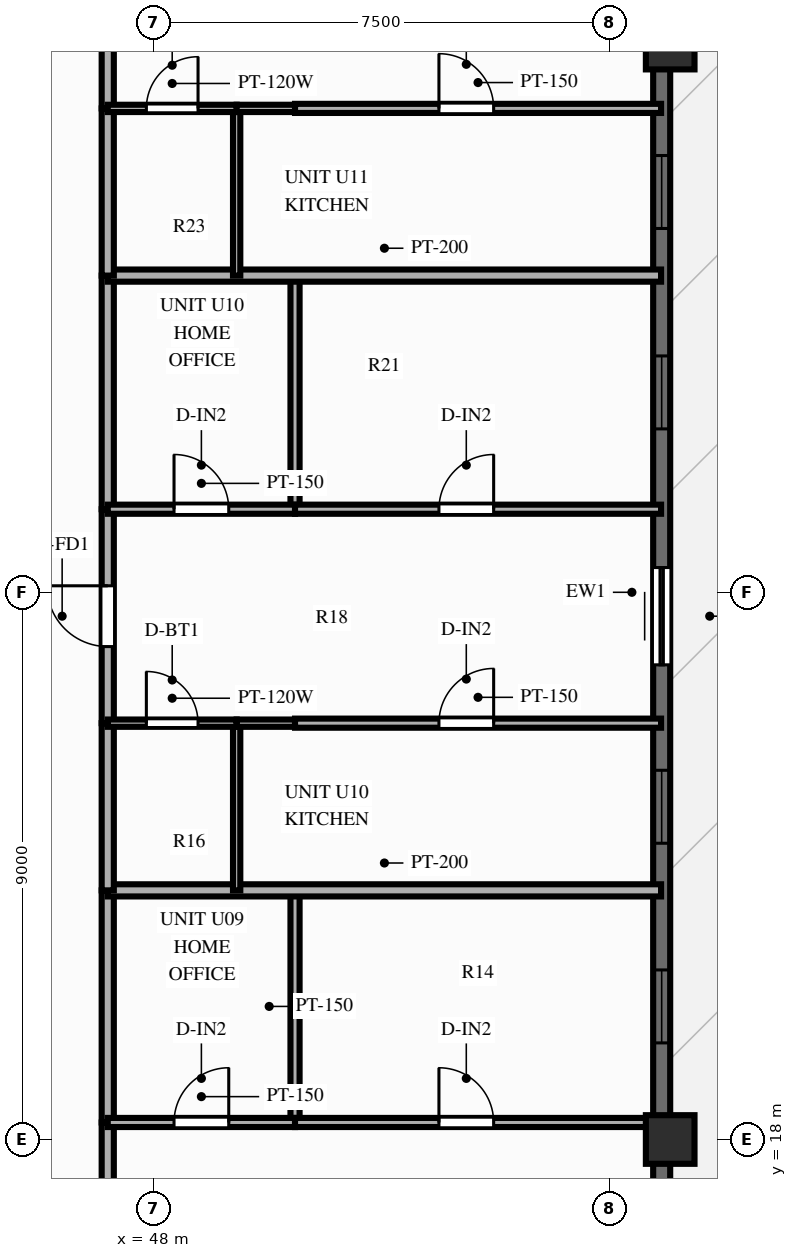
"""IFC4 building model, lengths in metres.
Left out: names, types, materials, properties, quantities, classifications, styles, units other than length and angle.
Written with IfcOpenShell. Run it as: python <this file> out.ifc"""

import sys

from ifc_helpers import new_model, si_unit, direction, frame, frame_2d, origin, origin_2d, place, context, subcontext, project, spatial, rectangle, extrude, source, transform, mapped, element, fill, save


model = new_model("IFC4")
c1 = context("Model", 3, precision=1e-05, world=origin(), true_north=direction((0.0, 1.0)))
c2 = subcontext(c1, "Body", "Model", "MODEL_VIEW")
j1 = project(units=[si_unit("LENGTHUNIT", "METRE"), si_unit("PLANEANGLEUNIT", "RADIAN")], contexts=[c1])
p1 = place(None, origin())
s1 = spatial("IfcSite", under=j1, at=p1, CompositionType="ELEMENT")
p2 = place(p1, origin())
s2 = spatial("IfcBuilding", under=s1, at=p2, CompositionType="ELEMENT")
p3 = place(p2, frame((0.0, 0.0, 199.6)))
s3 = spatial("IfcBuildingStorey", under=s2, at=p3, CompositionType="ELEMENT", Elevation=199.6)
m1 = source(origin(), c2, "Body", "SweptSolid", [
    extrude(rectangle(XDim=0.8, YDim=0.8, at=origin_2d()), origin(), (0.0, 0.0, 1.0), 3.0),
])
for number, where, z_axis, x_axis in (
    (1, (56.5, 18.0, 0.0), (0.0, 0.0, 1.0), (1.0, 0.0, 0.0)),
    (2, (56.5, 36.0, 0.0), (0.0, 0.0, 1.0), (1.0, 0.0, 0.0)),
):
    element("IfcColumn", number, at=place(p3, frame(where, z_axis=z_axis, x_axis=x_axis)), inside=s3, PredefinedType="COLUMN", context=c2, shape_type="MappedRepresentation", body=[
        mapped(m1, transform((0.0, 0.0, 0.0), scale=1.0)),
    ])
p4 = place(p3, frame((56.36, 11.5, 0.0), z_axis=(0.0, 0.0, 1.0), x_axis=(0.0, 1.0, 0.0)))
e3 = element("IfcWall", 3, at=p4, inside=s3, PredefinedType="SOLIDWALL", context=c2, shape_type="SweptSolid", body=[
    extrude(rectangle(XDim=31.0, YDim=0.28, at=frame_2d((15.5, 0.0))), origin(), (0.0, 0.0, 1.0), 2.28),
])
p5 = place(p4, frame((0.985, 0.0, 0.25)))
e4 = element("IfcOpeningElement", 4, at=p5, cuts=e3, PredefinedType="OPENING", context=c2, shape_type="SweptSolid", body=[
    extrude(rectangle(XDim=1.2, YDim=1.5, at=frame_2d((0.6, 0.75))), frame((0.0, 0.152, 0.0), z_axis=(0.0, -1.0, 0.0), x_axis=(1.0, 0.0, 0.0)), (0.0, 0.0, 1.0), 0.304),
])
p6 = place(p4, frame((3.995, 0.0, 0.25)))
e5 = element("IfcOpeningElement", 5, at=p6, cuts=e3, PredefinedType="OPENING", context=c2, shape_type="SweptSolid", body=[
    extrude(rectangle(XDim=1.2, YDim=1.5, at=frame_2d((0.6, 0.75))), frame((0.0, 0.152, 0.0), z_axis=(0.0, -1.0, 0.0), x_axis=(1.0, 0.0, 0.0)), (0.0, 0.0, 1.0), 0.304),
])
p7 = place(p4, frame((8.089, 0.0, 0.25)))
e6 = element("IfcOpeningElement", 6, at=p7, cuts=e3, PredefinedType="OPENING", context=c2, shape_type="SweptSolid", body=[
    extrude(rectangle(XDim=1.2, YDim=1.5, at=frame_2d((0.6, 0.75))), frame((0.0, 0.152, 0.0), z_axis=(0.0, -1.0, 0.0), x_axis=(1.0, 0.0, 0.0)), (0.0, 0.0, 1.0), 0.304),
])
p8 = place(p4, frame((11.373, 0.0, 0.25)))
e7 = element("IfcOpeningElement", 7, at=p8, cuts=e3, PredefinedType="OPENING", context=c2, shape_type="SweptSolid", body=[
    extrude(rectangle(XDim=1.2, YDim=1.5, at=frame_2d((0.6, 0.75))), frame((0.0, 0.152, 0.0), z_axis=(0.0, -1.0, 0.0), x_axis=(1.0, 0.0, 0.0)), (0.0, 0.0, 1.0), 0.304),
])
p9 = place(p4, frame((15.907, 0.0, 0.0), z_axis=(0.0, 0.0, 1.0), x_axis=(-1.0, 0.0, 0.0)))
e8 = element("IfcOpeningElement", 8, at=p9, cuts=e3, PredefinedType="OPENING", context=c2, shape_type="SweptSolid", body=[
    extrude(rectangle(XDim=1.6, YDim=2.15, at=frame_2d((0.8, 1.075))), frame((0.0, 0.152, 0.0), z_axis=(0.0, -1.0, 0.0), x_axis=(1.0, 0.0, 0.0)), (0.0, 0.0, 1.0), 0.304),
])
p10 = place(p4, frame((18.188, 0.0, 0.25)))
e9 = element("IfcOpeningElement", 9, at=p10, cuts=e3, PredefinedType="OPENING", context=c2, shape_type="SweptSolid", body=[
    extrude(rectangle(XDim=1.2, YDim=1.5, at=frame_2d((0.6, 0.75))), frame((0.0, 0.152, 0.0), z_axis=(0.0, -1.0, 0.0), x_axis=(1.0, 0.0, 0.0)), (0.0, 0.0, 1.0), 0.304),
])
p11 = place(p4, frame((21.484, 0.0, 0.25)))
e10 = element("IfcOpeningElement", 10, at=p11, cuts=e3, PredefinedType="OPENING", context=c2, shape_type="SweptSolid", body=[
    extrude(rectangle(XDim=1.2, YDim=1.5, at=frame_2d((0.6, 0.75))), frame((0.0, 0.152, 0.0), z_axis=(0.0, -1.0, 0.0), x_axis=(1.0, 0.0, 0.0)), (0.0, 0.0, 1.0), 0.304),
])
p12 = place(p4, frame((25.259, 0.0, 0.25)))
e11 = element("IfcOpeningElement", 11, at=p12, cuts=e3, PredefinedType="OPENING", context=c2, shape_type="SweptSolid", body=[
    extrude(rectangle(XDim=1.2, YDim=1.5, at=frame_2d((0.6, 0.75))), frame((0.0, 0.152, 0.0), z_axis=(0.0, -1.0, 0.0), x_axis=(1.0, 0.0, 0.0)), (0.0, 0.0, 1.0), 0.304),
])
p13 = place(p4, frame((28.269, 0.0, 0.25)))
e12 = element("IfcOpeningElement", 12, at=p13, cuts=e3, PredefinedType="OPENING", context=c2, shape_type="SweptSolid", body=[
    extrude(rectangle(XDim=1.2, YDim=1.5, at=frame_2d((0.6, 0.75))), frame((0.0, 0.152, 0.0), z_axis=(0.0, -1.0, 0.0), x_axis=(1.0, 0.0, 0.0)), (0.0, 0.0, 1.0), 0.304),
])
p14 = place(p3, frame((47.25, 14.43, 0.0), z_axis=(0.0, 0.0, 1.0), x_axis=(0.0, 1.0, 0.0)))
e13 = element("IfcWall", 13, at=p14, inside=s3, PredefinedType="PARTITIONING", context=c2, shape_type="SweptSolid", body=[
    extrude(rectangle(XDim=3.85, YDim=0.2, at=frame_2d((1.925, 0.0))), origin(), (0.0, 0.0, 1.0), 2.79),
])
p15 = place(p14, frame((1.425, 0.0, 0.0)))
e14 = element("IfcOpeningElement", 14, at=p15, cuts=e13, PredefinedType="OPENING", context=c2, shape_type="SweptSolid", body=[
    extrude(rectangle(XDim=1.0, YDim=2.15, at=frame_2d((0.5, 1.075))), frame((0.0, 0.112, 0.0), z_axis=(0.0, -1.0, 0.0), x_axis=(1.0, 0.0, 0.0)), (0.0, 0.0, 1.0), 0.224),
])
p16 = place(p3, frame((47.25, 18.28, 0.0), z_axis=(0.0, 0.0, 1.0), x_axis=(0.0, 1.0, 0.0)))
e15 = element("IfcWall", 15, at=p16, inside=s3, PredefinedType="PARTITIONING", context=c2, shape_type="SweptSolid", body=[
    extrude(rectangle(XDim=3.818, YDim=0.2, at=frame_2d((1.909, 0.0))), origin(), (0.0, 0.0, 1.0), 2.79),
])
p17 = place(p3, frame((50.33, 18.28, 0.0), z_axis=(0.0, 0.0, 1.0), x_axis=(0.0, 1.0, 0.0)))
e16 = element("IfcWall", 16, at=p17, inside=s3, PredefinedType="PARTITIONING", context=c2, shape_type="SweptSolid", body=[
    extrude(rectangle(XDim=3.818, YDim=0.15, at=frame_2d((1.909, 0.0))), origin(), (0.0, 0.0, 1.0), 2.49),
])
p18 = place(p3, frame((47.25, 18.28, 0.0), z_axis=(0.0, 0.0, 1.0), x_axis=(1.0, 0.0, 0.0)))
e17 = element("IfcWall", 17, at=p18, inside=s3, PredefinedType="PARTITIONING", context=c2, shape_type="SweptSolid", body=[
    extrude(rectangle(XDim=3.08, YDim=0.15, at=frame_2d((1.54, 0.0))), origin(), (0.0, 0.0, 1.0), 2.79),
])
p19 = place(p18, frame((1.09, 0.0, 0.0)))
e18 = element("IfcOpeningElement", 18, at=p19, cuts=e17, PredefinedType="OPENING", context=c2, shape_type="SweptSolid", body=[
    extrude(rectangle(XDim=0.9, YDim=2.1, at=frame_2d((0.45, 1.05))), frame((0.0, 0.087, 0.0), z_axis=(0.0, -1.0, 0.0), x_axis=(1.0, 0.0, 0.0)), (0.0, 0.0, 1.0), 0.174),
])
p20 = place(p3, frame((50.33, 18.28, 0.0), z_axis=(0.0, 0.0, 1.0), x_axis=(1.0, 0.0, 0.0)))
e19 = element("IfcWall", 19, at=p20, inside=s3, PredefinedType="PARTITIONING", context=c2, shape_type="SweptSolid", body=[
    extrude(rectangle(XDim=6.02, YDim=0.15, at=frame_2d((3.01, 0.0))), origin(), (0.0, 0.0, 1.0), 2.79),
])
p21 = place(p20, frame((2.367, 0.0, 0.0)))
e20 = element("IfcOpeningElement", 20, at=p21, cuts=e19, PredefinedType="OPENING", context=c2, shape_type="SweptSolid", body=[
    extrude(rectangle(XDim=0.9, YDim=2.1, at=frame_2d((0.45, 1.05))), frame((0.0, 0.087, 0.0), z_axis=(0.0, -1.0, 0.0), x_axis=(1.0, 0.0, 0.0)), (0.0, 0.0, 1.0), 0.174),
])
p22 = place(p3, frame((47.25, 22.098, 0.0), z_axis=(0.0, 0.0, 1.0), x_axis=(1.0, 0.0, 0.0)))
e21 = element("IfcWall", 21, at=p22, inside=s3, PredefinedType="PARTITIONING", context=c2, shape_type="SweptSolid", body=[
    extrude(rectangle(XDim=9.1, YDim=0.2, at=frame_2d((4.55, 0.0))), origin(), (0.0, 0.0, 1.0), 2.39),
])
p23 = place(p3, frame((47.25, 22.098, 0.0), z_axis=(0.0, 0.0, 1.0), x_axis=(0.0, 1.0, 0.0)))
e22 = element("IfcWall", 22, at=p23, inside=s3, PredefinedType="PARTITIONING", context=c2, shape_type="SweptSolid", body=[
    extrude(rectangle(XDim=2.75, YDim=0.2, at=frame_2d((1.375, 0.0))), origin(), (0.0, 0.0, 1.0), 2.79),
])
p24 = place(p3, frame((47.25, 24.848, 0.0), z_axis=(0.0, 0.0, 1.0), x_axis=(0.0, 1.0, 0.0)))
e23 = element("IfcWall", 23, at=p24, inside=s3, PredefinedType="PARTITIONING", context=c2, shape_type="SweptSolid", body=[
    extrude(rectangle(XDim=3.519, YDim=0.2, at=frame_2d((1.759, 0.0))), origin(), (0.0, 0.0, 1.0), 2.79),
])
p25 = place(p24, frame((1.26, 0.0, 0.0)))
e24 = element("IfcOpeningElement", 24, at=p25, cuts=e23, PredefinedType="OPENING", context=c2, shape_type="SweptSolid", body=[
    extrude(rectangle(XDim=1.0, YDim=2.15, at=frame_2d((0.5, 1.075))), frame((0.0, 0.112, 0.0), z_axis=(0.0, -1.0, 0.0), x_axis=(1.0, 0.0, 0.0)), (0.0, 0.0, 1.0), 0.224),
])
p26 = place(p3, frame((47.25, 28.366, 0.0), z_axis=(0.0, 0.0, 1.0), x_axis=(0.0, 1.0, 0.0)))
e25 = element("IfcWall", 25, at=p26, inside=s3, PredefinedType="PARTITIONING", context=c2, shape_type="SweptSolid", body=[
    extrude(rectangle(XDim=3.842, YDim=0.2, at=frame_2d((1.921, 0.0))), origin(), (0.0, 0.0, 1.0), 2.79),
])
p27 = place(p3, frame((49.37, 22.098, 0.0), z_axis=(0.0, 0.0, 1.0), x_axis=(0.0, 1.0, 0.0)))
e26 = element("IfcWall", 26, at=p27, inside=s3, PredefinedType="PARTITIONING", context=c2, shape_type="SweptSolid", body=[
    extrude(rectangle(XDim=2.75, YDim=0.12, at=frame_2d((1.375, 0.0))), origin(), (0.0, 0.0, 1.0), 2.79),
])
p28 = place(p3, frame((50.33, 28.366, 0.0), z_axis=(0.0, 0.0, 1.0), x_axis=(0.0, 1.0, 0.0)))
e27 = element("IfcWall", 27, at=p28, inside=s3, PredefinedType="PARTITIONING", context=c2, shape_type="SweptSolid", body=[
    extrude(rectangle(XDim=3.842, YDim=0.15, at=frame_2d((1.921, 0.0))), origin(), (0.0, 0.0, 1.0), 2.49),
])
p29 = place(p3, frame((47.25, 24.848, 0.0), z_axis=(0.0, 0.0, 1.0), x_axis=(1.0, 0.0, 0.0)))
e28 = element("IfcWall", 28, at=p29, inside=s3, PredefinedType="PARTITIONING", context=c2, shape_type="SweptSolid", body=[
    extrude(rectangle(XDim=2.12, YDim=0.12, at=frame_2d((1.06, 0.0))), origin(), (0.0, 0.0, 1.0), 2.79),
])
p30 = place(p29, frame((0.635, 0.0, 0.0)))
e29 = element("IfcOpeningElement", 29, at=p30, cuts=e28, PredefinedType="OPENING", context=c2, shape_type="SweptSolid", body=[
    extrude(rectangle(XDim=0.85, YDim=2.05, at=frame_2d((0.425, 1.025))), frame((0.0, 0.072, 0.0), z_axis=(0.0, -1.0, 0.0), x_axis=(1.0, 0.0, 0.0)), (0.0, 0.0, 1.0), 0.144),
])
p31 = place(p3, frame((49.37, 24.848, 0.0), z_axis=(0.0, 0.0, 1.0), x_axis=(1.0, 0.0, 0.0)))
e30 = element("IfcWall", 30, at=p31, inside=s3, PredefinedType="PARTITIONING", context=c2, shape_type="SweptSolid", body=[
    extrude(rectangle(XDim=0.96, YDim=0.12, at=frame_2d((0.48, 0.0))), origin(), (0.0, 0.0, 1.0), 2.79),
])
p32 = place(p3, frame((50.33, 24.848, 0.0), z_axis=(0.0, 0.0, 1.0), x_axis=(1.0, 0.0, 0.0)))
e31 = element("IfcWall", 31, at=p32, inside=s3, PredefinedType="PARTITIONING", context=c2, shape_type="SweptSolid", body=[
    extrude(rectangle(XDim=6.02, YDim=0.15, at=frame_2d((3.01, 0.0))), origin(), (0.0, 0.0, 1.0), 2.79),
])
p33 = place(p32, frame((2.367, 0.0, 0.0)))
e32 = element("IfcOpeningElement", 32, at=p33, cuts=e31, PredefinedType="OPENING", context=c2, shape_type="SweptSolid", body=[
    extrude(rectangle(XDim=0.9, YDim=2.1, at=frame_2d((0.45, 1.05))), frame((0.0, 0.087, 0.0), z_axis=(0.0, -1.0, 0.0), x_axis=(1.0, 0.0, 0.0)), (0.0, 0.0, 1.0), 0.174),
])
p34 = place(p3, frame((47.25, 28.366, 0.0), z_axis=(0.0, 0.0, 1.0), x_axis=(1.0, 0.0, 0.0)))
e33 = element("IfcWall", 33, at=p34, inside=s3, PredefinedType="PARTITIONING", context=c2, shape_type="SweptSolid", body=[
    extrude(rectangle(XDim=3.08, YDim=0.15, at=frame_2d((1.54, 0.0))), origin(), (0.0, 0.0, 1.0), 2.79),
])
p35 = place(p34, frame((1.09, 0.0, 0.0)))
e34 = element("IfcOpeningElement", 34, at=p35, cuts=e33, PredefinedType="OPENING", context=c2, shape_type="SweptSolid", body=[
    extrude(rectangle(XDim=0.9, YDim=2.1, at=frame_2d((0.45, 1.05))), frame((0.0, 0.087, 0.0), z_axis=(0.0, -1.0, 0.0), x_axis=(1.0, 0.0, 0.0)), (0.0, 0.0, 1.0), 0.174),
])
p36 = place(p3, frame((50.33, 28.366, 0.0), z_axis=(0.0, 0.0, 1.0), x_axis=(1.0, 0.0, 0.0)))
e35 = element("IfcWall", 35, at=p36, inside=s3, PredefinedType="PARTITIONING", context=c2, shape_type="SweptSolid", body=[
    extrude(rectangle(XDim=6.02, YDim=0.15, at=frame_2d((3.01, 0.0))), origin(), (0.0, 0.0, 1.0), 2.79),
])
p37 = place(p36, frame((2.367, 0.0, 0.0)))
e36 = element("IfcOpeningElement", 36, at=p37, cuts=e35, PredefinedType="OPENING", context=c2, shape_type="SweptSolid", body=[
    extrude(rectangle(XDim=0.9, YDim=2.1, at=frame_2d((0.45, 1.05))), frame((0.0, 0.087, 0.0), z_axis=(0.0, -1.0, 0.0), x_axis=(1.0, 0.0, 0.0)), (0.0, 0.0, 1.0), 0.174),
])
p38 = place(p3, frame((47.25, 32.209, 0.0), z_axis=(0.0, 0.0, 1.0), x_axis=(1.0, 0.0, 0.0)))
e37 = element("IfcWall", 37, at=p38, inside=s3, PredefinedType="PARTITIONING", context=c2, shape_type="SweptSolid", body=[
    extrude(rectangle(XDim=9.1, YDim=0.2, at=frame_2d((4.55, 0.0))), origin(), (0.0, 0.0, 1.0), 2.39),
])
p39 = place(p3, frame((47.25, 32.209, 0.0), z_axis=(0.0, 0.0, 1.0), x_axis=(0.0, 1.0, 0.0)))
e38 = element("IfcWall", 38, at=p39, inside=s3, PredefinedType="PARTITIONING", context=c2, shape_type="SweptSolid", body=[
    extrude(rectangle(XDim=2.75, YDim=0.2, at=frame_2d((1.375, 0.0))), origin(), (0.0, 0.0, 1.0), 2.79),
])
p40 = place(p3, frame((47.25, 34.959, 0.0), z_axis=(0.0, 0.0, 1.0), x_axis=(0.0, 1.0, 0.0)))
e39 = element("IfcWall", 39, at=p40, inside=s3, PredefinedType="PARTITIONING", context=c2, shape_type="SweptSolid", body=[
    extrude(rectangle(XDim=3.519, YDim=0.2, at=frame_2d((1.76, 0.0))), origin(), (0.0, 0.0, 1.0), 2.79),
])
p41 = place(p40, frame((2.217, 0.0, 0.0)))
e40 = element("IfcOpeningElement", 40, at=p41, cuts=e39, PredefinedType="OPENING", context=c2, shape_type="SweptSolid", body=[
    extrude(rectangle(XDim=1.0, YDim=2.15, at=frame_2d((0.5, 1.075))), frame((0.0, 0.112, 0.0), z_axis=(0.0, -1.0, 0.0), x_axis=(1.0, 0.0, 0.0)), (0.0, 0.0, 1.0), 0.224),
])
p42 = place(p3, frame((49.37, 32.209, 0.0), z_axis=(0.0, 0.0, 1.0), x_axis=(0.0, 1.0, 0.0)))
e41 = element("IfcWall", 41, at=p42, inside=s3, PredefinedType="PARTITIONING", context=c2, shape_type="SweptSolid", body=[
    extrude(rectangle(XDim=2.75, YDim=0.12, at=frame_2d((1.375, 0.0))), origin(), (0.0, 0.0, 1.0), 2.79),
])
p43 = place(p3, frame((47.25, 34.959, 0.0), z_axis=(0.0, 0.0, 1.0), x_axis=(1.0, 0.0, 0.0)))
e42 = element("IfcWall", 42, at=p43, inside=s3, PredefinedType="PARTITIONING", context=c2, shape_type="SweptSolid", body=[
    extrude(rectangle(XDim=2.12, YDim=0.12, at=frame_2d((1.06, 0.0))), origin(), (0.0, 0.0, 1.0), 2.79),
])
p44 = place(p43, frame((0.635, 0.0, 0.0)))
e43 = element("IfcOpeningElement", 43, at=p44, cuts=e42, PredefinedType="OPENING", context=c2, shape_type="SweptSolid", body=[
    extrude(rectangle(XDim=0.85, YDim=2.05, at=frame_2d((0.425, 1.025))), frame((0.0, 0.072, 0.0), z_axis=(0.0, -1.0, 0.0), x_axis=(1.0, 0.0, 0.0)), (0.0, 0.0, 1.0), 0.144),
])
p45 = place(p3, frame((49.37, 34.959, 0.0), z_axis=(0.0, 0.0, 1.0), x_axis=(1.0, 0.0, 0.0)))
e44 = element("IfcWall", 44, at=p45, inside=s3, PredefinedType="PARTITIONING", context=c2, shape_type="SweptSolid", body=[
    extrude(rectangle(XDim=0.96, YDim=0.12, at=frame_2d((0.48, 0.0))), origin(), (0.0, 0.0, 1.0), 2.79),
])
p46 = place(p3, frame((50.33, 34.959, 0.0), z_axis=(0.0, 0.0, 1.0), x_axis=(1.0, 0.0, 0.0)))
e45 = element("IfcWall", 45, at=p46, inside=s3, PredefinedType="PARTITIONING", context=c2, shape_type="SweptSolid", body=[
    extrude(rectangle(XDim=6.02, YDim=0.15, at=frame_2d((3.01, 0.0))), origin(), (0.0, 0.0, 1.0), 2.79),
])
p47 = place(p46, frame((2.367, 0.0, 0.0)))
e46 = element("IfcOpeningElement", 46, at=p47, cuts=e45, PredefinedType="OPENING", context=c2, shape_type="SweptSolid", body=[
    extrude(rectangle(XDim=0.9, YDim=2.1, at=frame_2d((0.45, 1.05))), frame((0.0, 0.087, 0.0), z_axis=(0.0, -1.0, 0.0), x_axis=(1.0, 0.0, 0.0)), (0.0, 0.0, 1.0), 0.174),
])
m2 = source(origin(), c2, "Body", "SweptSolid", [
    extrude(rectangle(XDim=1.2, YDim=1.5, at=frame_2d((0.6, 0.75))), frame((0.0, 0.03, 0.0), z_axis=(0.0, -1.0, 0.0), x_axis=(1.0, 0.0, 0.0)), (0.0, 0.0, 1.0), 0.06),
])
p48 = place(p7, origin())
e47 = element("IfcWindow", 47, at=p48, inside=s3, PartitioningType="SINGLE_PANEL", PredefinedType="WINDOW", context=c2, shape_type="MappedRepresentation", body=[
    mapped(m2, transform((0.0, 0.0, 0.0), scale=1.0)),
])
fill(e6, e47)
p49 = place(p8, origin())
e48 = element("IfcWindow", 48, at=p49, inside=s3, PartitioningType="SINGLE_PANEL", PredefinedType="WINDOW", context=c2, shape_type="MappedRepresentation", body=[
    mapped(m2, transform((0.0, 0.0, 0.0), scale=1.0)),
])
fill(e7, e48)
m3 = source(origin(), c2, "Body", "SweptSolid", [
    extrude(rectangle(XDim=1.6, YDim=2.15, at=frame_2d((0.8, 1.075))), frame((0.0, 0.025, 0.0), z_axis=(0.0, -1.0, 0.0), x_axis=(1.0, 0.0, 0.0)), (0.0, 0.0, 1.0), 0.05),
])
p50 = place(p9, origin())
e49 = element("IfcDoor", 49, at=p50, inside=s3, OperationType="SLIDING_TO_LEFT", PredefinedType="DOOR", context=c2, shape_type="MappedRepresentation", body=[
    mapped(m3, transform((0.0, 0.0, 0.0), scale=1.0)),
])
fill(e8, e49)
p51 = place(p10, origin())
e50 = element("IfcWindow", 50, at=p51, inside=s3, PartitioningType="SINGLE_PANEL", PredefinedType="WINDOW", context=c2, shape_type="MappedRepresentation", body=[
    mapped(m2, transform((0.0, 0.0, 0.0), scale=1.0)),
])
fill(e9, e50)
p52 = place(p11, origin())
e51 = element("IfcWindow", 51, at=p52, inside=s3, PartitioningType="SINGLE_PANEL", PredefinedType="WINDOW", context=c2, shape_type="MappedRepresentation", body=[
    mapped(m2, transform((0.0, 0.0, 0.0), scale=1.0)),
])
fill(e10, e51)
m4 = source(origin(), c2, "Body", "SweptSolid", [
    extrude(rectangle(XDim=0.9, YDim=2.1, at=frame_2d((0.45, 1.05))), frame((0.0, 0.025, 0.0), z_axis=(0.0, -1.0, 0.0), x_axis=(1.0, 0.0, 0.0)), (0.0, 0.0, 1.0), 0.05),
])
p53 = place(p19, origin())
e52 = element("IfcDoor", 52, at=p53, inside=s3, OperationType="SINGLE_SWING_RIGHT", PredefinedType="DOOR", context=c2, shape_type="MappedRepresentation", body=[
    mapped(m4, transform((0.0, 0.0, 0.0), scale=1.0)),
])
fill(e18, e52)
p54 = place(p21, origin())
e53 = element("IfcDoor", 53, at=p54, inside=s3, OperationType="SINGLE_SWING_LEFT", PredefinedType="DOOR", context=c2, shape_type="MappedRepresentation", body=[
    mapped(m4, transform((0.0, 0.0, 0.0), scale=1.0)),
])
fill(e20, e53)
m5 = source(origin(), c2, "Body", "SweptSolid", [
    extrude(rectangle(XDim=1.0, YDim=2.15, at=frame_2d((0.5, 1.075))), frame((0.0, 0.025, 0.0), z_axis=(0.0, -1.0, 0.0), x_axis=(1.0, 0.0, 0.0)), (0.0, 0.0, 1.0), 0.05),
])
p55 = place(p25, origin())
e54 = element("IfcDoor", 54, at=p55, inside=s3, OperationType="SINGLE_SWING_RIGHT", PredefinedType="DOOR", context=c2, shape_type="MappedRepresentation", body=[
    mapped(m5, transform((0.0, 0.0, 0.0), scale=1.0)),
])
fill(e24, e54)
m6 = source(origin(), c2, "Body", "SweptSolid", [
    extrude(rectangle(XDim=0.85, YDim=2.05, at=frame_2d((0.425, 1.025))), frame((0.0, 0.025, 0.0), z_axis=(0.0, -1.0, 0.0), x_axis=(1.0, 0.0, 0.0)), (0.0, 0.0, 1.0), 0.05),
])
p56 = place(p30, origin())
e55 = element("IfcDoor", 55, at=p56, inside=s3, OperationType="SINGLE_SWING_LEFT", PredefinedType="DOOR", context=c2, shape_type="MappedRepresentation", body=[
    mapped(m6, transform((0.0, 0.0, 0.0), scale=1.0)),
])
fill(e29, e55)
p57 = place(p33, origin())
e56 = element("IfcDoor", 56, at=p57, inside=s3, OperationType="SINGLE_SWING_RIGHT", PredefinedType="DOOR", context=c2, shape_type="MappedRepresentation", body=[
    mapped(m4, transform((0.0, 0.0, 0.0), scale=1.0)),
])
fill(e32, e56)
p58 = place(p35, origin())
e57 = element("IfcDoor", 57, at=p58, inside=s3, OperationType="SINGLE_SWING_LEFT", PredefinedType="DOOR", context=c2, shape_type="MappedRepresentation", body=[
    mapped(m4, transform((0.0, 0.0, 0.0), scale=1.0)),
])
fill(e34, e57)
p59 = place(p37, origin())
e58 = element("IfcDoor", 58, at=p59, inside=s3, OperationType="SINGLE_SWING_RIGHT", PredefinedType="DOOR", context=c2, shape_type="MappedRepresentation", body=[
    mapped(m4, transform((0.0, 0.0, 0.0), scale=1.0)),
])
fill(e36, e58)
p60 = place(p44, origin())
e59 = element("IfcDoor", 59, at=p60, inside=s3, OperationType="SINGLE_SWING_RIGHT", PredefinedType="DOOR", context=c2, shape_type="MappedRepresentation", body=[
    mapped(m6, transform((0.0, 0.0, 0.0), scale=1.0)),
])
fill(e43, e59)
p61 = place(p47, origin())
e60 = element("IfcDoor", 60, at=p61, inside=s3, OperationType="SINGLE_SWING_LEFT", PredefinedType="DOOR", context=c2, shape_type="MappedRepresentation", body=[
    mapped(m4, transform((0.0, 0.0, 0.0), scale=1.0)),
])
fill(e46, e60)
save(model, sys.argv[1])
